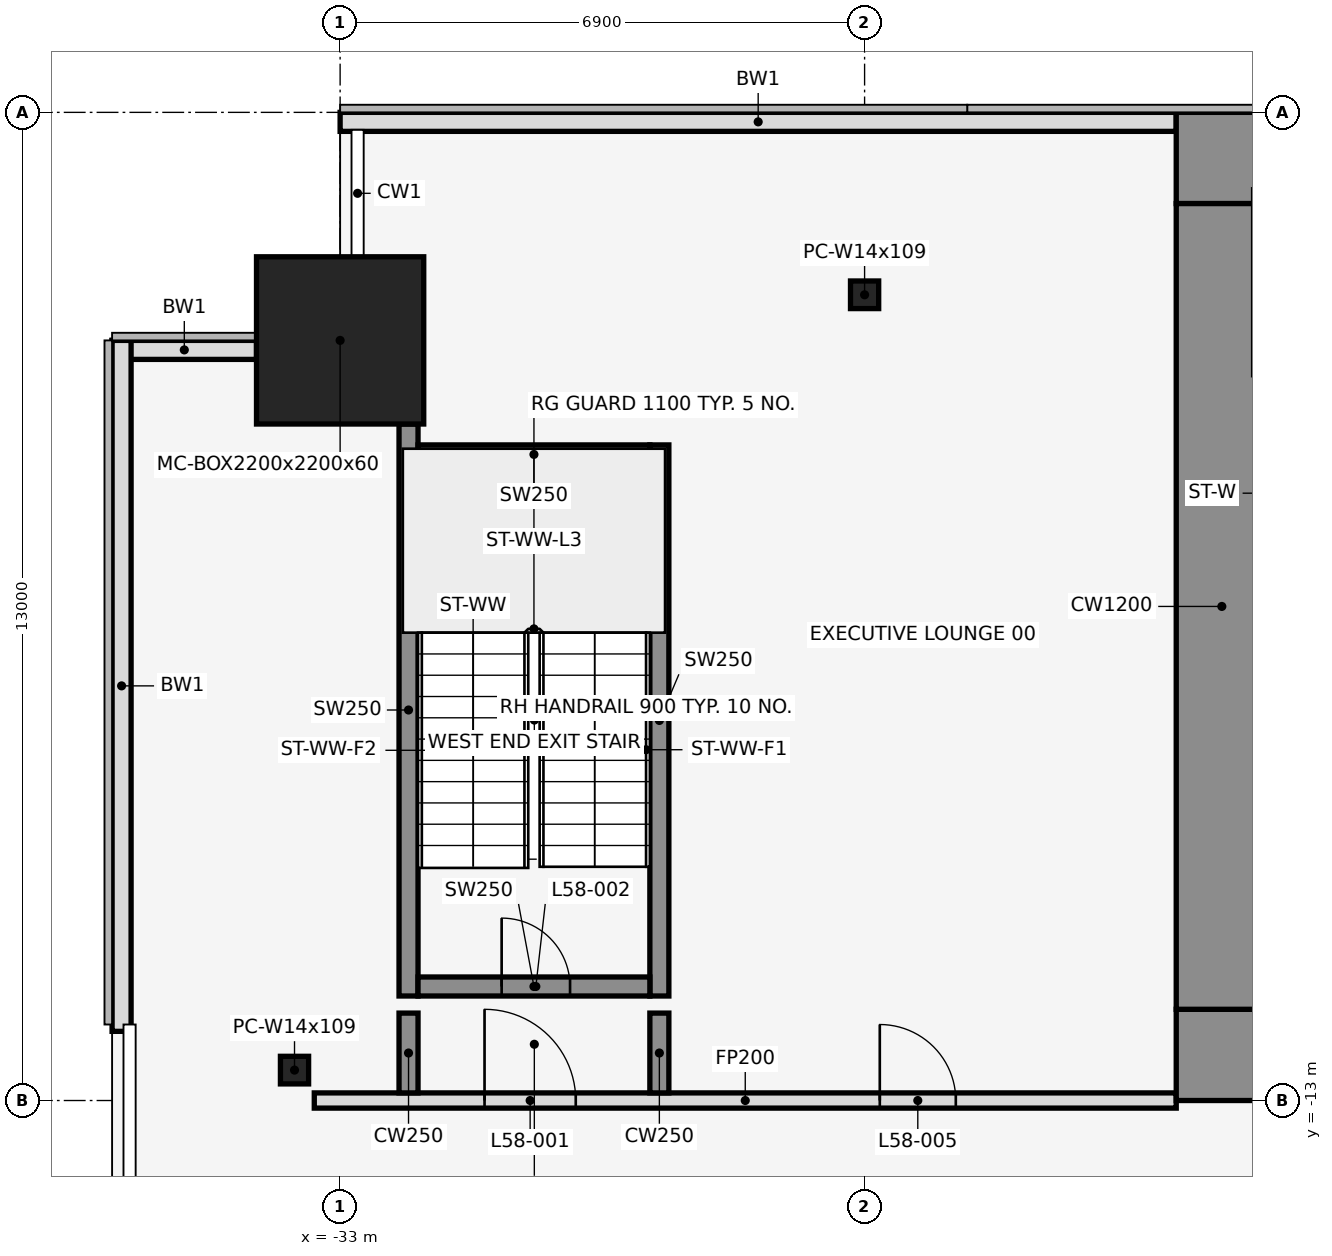
"""IFC4 building model, lengths in metres.
Left out: names, types, materials, properties, quantities, classifications, styles, units other than length and angle.
Written with IfcOpenShell. Run it as: python <this file> out.ifc"""

import sys

from ifc_helpers import new_model, si_unit, direction, frame, frame_2d, origin, origin_2d, place, context, subcontext, project, spatial, rectangle, hollow_rectangle, i_section, extrude, element, fill, save


model = new_model("IFC4")
c1 = context("Model", 3, precision=1e-05, world=origin(), true_north=direction((0.0, 1.0)))
c2 = subcontext(c1, "Body", "Model", "MODEL_VIEW")
j1 = project(units=[si_unit("LENGTHUNIT", "METRE"), si_unit("PLANEANGLEUNIT", "RADIAN")], contexts=[c1])
p1 = place(None, origin())
s1 = spatial("IfcSite", under=j1, at=p1, CompositionType="ELEMENT")
p2 = place(p1, origin())
s2 = spatial("IfcBuilding", under=s1, at=p2, CompositionType="ELEMENT")
p3 = place(p2, frame((0.0, 0.0, 258.2)))
s3 = spatial("IfcBuildingStorey", under=s2, at=p3, CompositionType="ELEMENT", Elevation=258.2)
p4 = place(p3, frame((-33.0, -3.0, 0.0), z_axis=(0.0, 0.0, 1.0), x_axis=(1.0, 0.0, 0.0)))
e1 = element("IfcColumn", 1, at=p4, inside=s3, PredefinedType="COLUMN", context=c2, shape_type="SweptSolid", body=[
    extrude(hollow_rectangle(XDim=2.2, YDim=2.2, WallThickness=0.06, at=origin_2d()), origin(), (0.0, 0.0, 1.0), 4.2),
])
for number, where, z_axis, x_axis in (
    (2, (-26.1, -2.4, 0.0), (0.0, 0.0, 1.0), (1.0, 0.0, 0.0)),
    (3, (-33.6, -12.6, 0.0), (0.0, 0.0, 1.0), (1.0, 0.0, 0.0)),
):
    element("IfcColumn", number, at=place(p3, frame(where, z_axis=z_axis, x_axis=x_axis)), inside=s3, PredefinedType="COLUMN", context=c2, shape_type="SweptSolid", body=[
        extrude(i_section(OverallWidth=0.371, OverallDepth=0.363, WebThickness=0.013, FlangeThickness=0.022, at=origin_2d()), origin(), (0.0, 0.0, 1.0), 4.2),
    ])
p5 = place(p3, frame((-22.0, -0.125, 0.0), z_axis=(0.0, 0.0, 1.0), x_axis=(-1.0, 0.0, 0.0)))
e4 = element("IfcWall", 4, at=p5, inside=s3, PredefinedType="STANDARD", context=c2, shape_type="SweptSolid", body=[
    extrude(rectangle(XDim=11.0, YDim=0.25, at=frame_2d((5.5, 0.0))), origin(), (0.0, 0.0, 1.0), 4.05),
])
p6 = place(p3, frame((-34.1, -3.125, 0.0), z_axis=(0.0, 0.0, 1.0), x_axis=(-1.0, 0.0, 0.0)))
e5 = element("IfcWall", 5, at=p6, inside=s3, PredefinedType="STANDARD", context=c2, shape_type="SweptSolid", body=[
    extrude(rectangle(XDim=1.9, YDim=0.25, at=frame_2d((0.95, 0.0))), origin(), (0.0, 0.0, 1.0), 4.05),
])
p7 = place(p3, frame((-35.875, -3.0, 0.0), z_axis=(0.0, 0.0, 1.0), x_axis=(0.0, -1.0, 0.0)))
e6 = element("IfcWall", 6, at=p7, inside=s3, PredefinedType="STANDARD", context=c2, shape_type="SweptSolid", body=[
    extrude(rectangle(XDim=9.09, YDim=0.25, at=frame_2d((4.545, 0.0))), origin(), (0.0, 0.0, 1.0), 4.05),
])
p8 = place(p3, frame((-32.1, -11.625, 0.0), z_axis=(0.0, 0.0, 1.0), x_axis=(0.0, 1.0, 0.0)))
e7 = element("IfcWall", 7, at=p8, inside=s3, PredefinedType="SHEAR", context=c2, shape_type="SweptSolid", body=[
    extrude(rectangle(XDim=7.525, YDim=0.25, at=frame_2d((3.762, 0.0))), origin(), (0.0, 0.0, 1.0), 4.2),
])
p9 = place(p3, frame((-28.8, -11.625, 0.0), z_axis=(0.0, 0.0, 1.0), x_axis=(0.0, 1.0, 0.0)))
e8 = element("IfcWall", 8, at=p9, inside=s3, PredefinedType="SHEAR", context=c2, shape_type="SweptSolid", body=[
    extrude(rectangle(XDim=7.25, YDim=0.25, at=frame_2d((3.625, 0.0))), origin(), (0.0, 0.0, 1.0), 4.2),
])
p10 = place(p3, frame((-31.975, -11.5, 0.0), z_axis=(0.0, 0.0, 1.0), x_axis=(1.0, 0.0, 0.0)))
e9 = element("IfcWall", 9, at=p10, inside=s3, PredefinedType="SHEAR", context=c2, shape_type="SweptSolid", body=[
    extrude(rectangle(XDim=3.05, YDim=0.25, at=frame_2d((1.525, 0.0))), origin(), (0.0, 0.0, 1.0), 4.2),
])
p11 = place(p10, frame((1.1, 0.0, 0.0)))
e10 = element("IfcOpeningElement", 10, at=p11, cuts=e9, PredefinedType="OPENING", context=c2, shape_type="SweptSolid", body=[
    extrude(rectangle(XDim=0.9, YDim=2.1, at=frame_2d((0.45, 1.05))), frame((0.0, 0.137, 0.0), z_axis=(0.0, -1.0, 0.0), x_axis=(1.0, 0.0, 0.0)), (0.0, 0.0, 1.0), 0.274),
])
p12 = place(p3, frame((-31.975, -4.5, 0.0), z_axis=(0.0, 0.0, 1.0), x_axis=(1.0, 0.0, 0.0)))
e11 = element("IfcWall", 11, at=p12, inside=s3, PredefinedType="SHEAR", context=c2, shape_type="SweptSolid", body=[
    extrude(rectangle(XDim=3.05, YDim=0.25, at=frame_2d((1.525, 0.0))), origin(), (0.0, 0.0, 1.0), 4.2),
])
p13 = place(p3, frame((-33.34, -13.0, 0.0), z_axis=(0.0, 0.0, 1.0), x_axis=(1.0, 0.0, 0.0)))
e12 = element("IfcWall", 12, at=p13, inside=s3, PredefinedType="PARTITIONING", context=c2, shape_type="SweptSolid", body=[
    extrude(rectangle(XDim=11.34, YDim=0.2, at=frame_2d((5.67, 0.0))), origin(), (0.0, 0.0, 1.0), 3.118),
])
p14 = place(p13, frame((2.24, 0.0, 0.0)))
e13 = element("IfcOpeningElement", 13, at=p14, cuts=e12, PredefinedType="OPENING", context=c2, shape_type="SweptSolid", body=[
    extrude(rectangle(XDim=1.2, YDim=2.1, at=frame_2d((0.6, 1.05))), frame((0.0, 0.112, 0.0), z_axis=(0.0, -1.0, 0.0), x_axis=(1.0, 0.0, 0.0)), (0.0, 0.0, 1.0), 0.224),
])
p15 = place(p13, frame((7.44, 0.0, 0.0)))
e14 = element("IfcOpeningElement", 14, at=p15, cuts=e12, PredefinedType="OPENING", context=c2, shape_type="SweptSolid", body=[
    extrude(rectangle(XDim=1.0, YDim=2.1, at=frame_2d((0.5, 1.05))), frame((0.0, 0.112, 0.0), z_axis=(0.0, -1.0, 0.0), x_axis=(1.0, 0.0, 0.0)), (0.0, 0.0, 1.0), 0.224),
])
for number, where, z_axis, x_axis in (
    (15, (-32.1, -12.9, 0.0), (0.0, 0.0, 1.0), (0.0, 1.0, 0.0)),
    (16, (-28.8, -12.9, 0.0), (0.0, 0.0, 1.0), (0.0, 1.0, 0.0)),
):
    element("IfcWall", number, at=place(p3, frame(where, z_axis=z_axis, x_axis=x_axis)), inside=s3, PredefinedType="SHEAR", context=c2, shape_type="SweptSolid", body=[
        extrude(rectangle(XDim=1.05, YDim=0.25, at=frame_2d((0.525, 0.0))), origin(), (0.0, 0.0, 1.0), 4.2),
    ])
p16 = place(p3, frame((-22.0, -0.6, 0.0), z_axis=(0.0, 0.0, 1.0), x_axis=(1.0, 0.0, 0.0)))
e17 = element("IfcWall", 17, at=p16, inside=s3, PredefinedType="SHEAR", context=c2, shape_type="SweptSolid", body=[
    extrude(rectangle(XDim=44.0, YDim=1.2, at=frame_2d((22.0, 0.0))), origin(), (0.0, 0.0, 1.0), 4.2),
])
p17 = place(p16, frame((18.55, 0.0, 0.0)))
e18 = element("IfcOpeningElement", 18, at=p17, cuts=e17, PredefinedType="OPENING", context=c2, shape_type="SweptSolid", body=[
    extrude(rectangle(XDim=0.9, YDim=2.1, at=frame_2d((0.45, 1.05))), frame((0.0, 0.612, 0.0), z_axis=(0.0, -1.0, 0.0), x_axis=(1.0, 0.0, 0.0)), (0.0, 0.0, 1.0), 1.224),
])
p18 = place(p16, frame((24.55, 0.0, 0.0)))
e19 = element("IfcOpeningElement", 19, at=p18, cuts=e17, PredefinedType="OPENING", context=c2, shape_type="SweptSolid", body=[
    extrude(rectangle(XDim=0.9, YDim=2.1, at=frame_2d((0.45, 1.05))), frame((0.0, 0.612, 0.0), z_axis=(0.0, -1.0, 0.0), x_axis=(1.0, 0.0, 0.0)), (0.0, 0.0, 1.0), 1.224),
])
p19 = place(p3, frame((-22.0, -12.4, 0.0), z_axis=(0.0, 0.0, 1.0), x_axis=(1.0, 0.0, 0.0)))
e20 = element("IfcWall", 20, at=p19, inside=s3, PredefinedType="SHEAR", context=c2, shape_type="SweptSolid", body=[
    extrude(rectangle(XDim=44.0, YDim=1.2, at=frame_2d((22.0, 0.0))), origin(), (0.0, 0.0, 1.0), 4.2),
])
p20 = place(p19, frame((2.2, 0.0, 0.0)))
e21 = element("IfcOpeningElement", 21, at=p20, cuts=e20, PredefinedType="OPENING", context=c2, shape_type="SweptSolid", body=[
    extrude(rectangle(XDim=1.2, YDim=2.1, at=frame_2d((0.6, 1.05))), frame((0.0, 0.612, 0.0), z_axis=(0.0, -1.0, 0.0), x_axis=(1.0, 0.0, 0.0)), (0.0, 0.0, 1.0), 1.224),
])
p21 = place(p19, frame((21.4, 0.0, 0.0)))
e22 = element("IfcOpeningElement", 22, at=p21, cuts=e20, PredefinedType="OPENING", context=c2, shape_type="SweptSolid", body=[
    extrude(rectangle(XDim=1.2, YDim=2.1, at=frame_2d((0.6, 1.05))), frame((0.0, 0.612, 0.0), z_axis=(0.0, -1.0, 0.0), x_axis=(1.0, 0.0, 0.0)), (0.0, 0.0, 1.0), 1.224),
])
p22 = place(p19, frame((40.6, 0.0, 0.0)))
e23 = element("IfcOpeningElement", 23, at=p22, cuts=e20, PredefinedType="OPENING", context=c2, shape_type="SweptSolid", body=[
    extrude(rectangle(XDim=1.2, YDim=2.1, at=frame_2d((0.6, 1.05))), frame((0.0, 0.612, 0.0), z_axis=(0.0, -1.0, 0.0), x_axis=(1.0, 0.0, 0.0)), (0.0, 0.0, 1.0), 1.224),
])
p23 = place(p19, frame((16.0, 0.0, 0.0)))
e24 = element("IfcOpeningElement", 24, at=p23, cuts=e20, PredefinedType="OPENING", context=c2, shape_type="SweptSolid", body=[
    extrude(rectangle(XDim=1.8, YDim=2.1, at=frame_2d((0.9, 1.05))), frame((0.0, 0.612, 0.0), z_axis=(0.0, -1.0, 0.0), x_axis=(1.0, 0.0, 0.0)), (0.0, 0.0, 1.0), 1.224),
])
p24 = place(p19, frame((6.3, 0.0, 0.0)))
e25 = element("IfcOpeningElement", 25, at=p24, cuts=e20, PredefinedType="OPENING", context=c2, shape_type="SweptSolid", body=[
    extrude(rectangle(XDim=1.2, YDim=2.1, at=frame_2d((0.6, 1.05))), frame((0.0, 0.612, 0.0), z_axis=(0.0, -1.0, 0.0), x_axis=(1.0, 0.0, 0.0)), (0.0, 0.0, 1.0), 1.224),
])
p25 = place(p19, frame((26.2, 0.0, 0.0)))
e26 = element("IfcOpeningElement", 26, at=p25, cuts=e20, PredefinedType="OPENING", context=c2, shape_type="SweptSolid", body=[
    extrude(rectangle(XDim=1.8, YDim=2.1, at=frame_2d((0.9, 1.05))), frame((0.0, 0.612, 0.0), z_axis=(0.0, -1.0, 0.0), x_axis=(1.0, 0.0, 0.0)), (0.0, 0.0, 1.0), 1.224),
])
p26 = place(p19, frame((36.5, 0.0, 0.0)))
e27 = element("IfcOpeningElement", 27, at=p26, cuts=e20, PredefinedType="OPENING", context=c2, shape_type="SweptSolid", body=[
    extrude(rectangle(XDim=1.2, YDim=2.1, at=frame_2d((0.6, 1.05))), frame((0.0, 0.612, 0.0), z_axis=(0.0, -1.0, 0.0), x_axis=(1.0, 0.0, 0.0)), (0.0, 0.0, 1.0), 1.224),
])
p27 = place(p3, frame((-21.4, -11.8, 0.0), z_axis=(0.0, 0.0, 1.0), x_axis=(0.0, 1.0, 0.0)))
e28 = element("IfcWall", 28, at=p27, inside=s3, PredefinedType="SHEAR", context=c2, shape_type="SweptSolid", body=[
    extrude(rectangle(XDim=10.6, YDim=1.2, at=frame_2d((5.3, 0.0))), origin(), (0.0, 0.0, 1.0), 4.2),
])
p28 = place(p14, origin())
e29 = element("IfcDoor", 29, at=p28, inside=s3, OperationType="SINGLE_SWING_LEFT", PredefinedType="DOOR", context=c2, shape_type="SweptSolid", body=[
    extrude(rectangle(XDim=1.2, YDim=2.1, at=frame_2d((0.6, 1.05))), frame((0.0, 0.025, 0.0), z_axis=(0.0, -1.0, 0.0), x_axis=(1.0, 0.0, 0.0)), (0.0, 0.0, 1.0), 0.05),
])
fill(e13, e29)
p29 = place(p11, origin())
e30 = element("IfcDoor", 30, at=p29, inside=s3, OperationType="SINGLE_SWING_LEFT", PredefinedType="DOOR", context=c2, shape_type="SweptSolid", body=[
    extrude(rectangle(XDim=0.9, YDim=2.1, at=frame_2d((0.45, 1.05))), frame((0.0, 0.025, 0.0), z_axis=(0.0, -1.0, 0.0), x_axis=(1.0, 0.0, 0.0)), (0.0, 0.0, 1.0), 0.05),
])
fill(e10, e30)
p30 = place(p15, origin())
e31 = element("IfcDoor", 31, at=p30, inside=s3, OperationType="SINGLE_SWING_LEFT", PredefinedType="DOOR", context=c2, shape_type="SweptSolid", body=[
    extrude(rectangle(XDim=1.0, YDim=2.1, at=frame_2d((0.5, 1.05))), frame((0.0, 0.025, 0.0), z_axis=(0.0, -1.0, 0.0), x_axis=(1.0, 0.0, 0.0)), (0.0, 0.0, 1.0), 0.05),
])
fill(e14, e31)
save(model, sys.argv[1])
